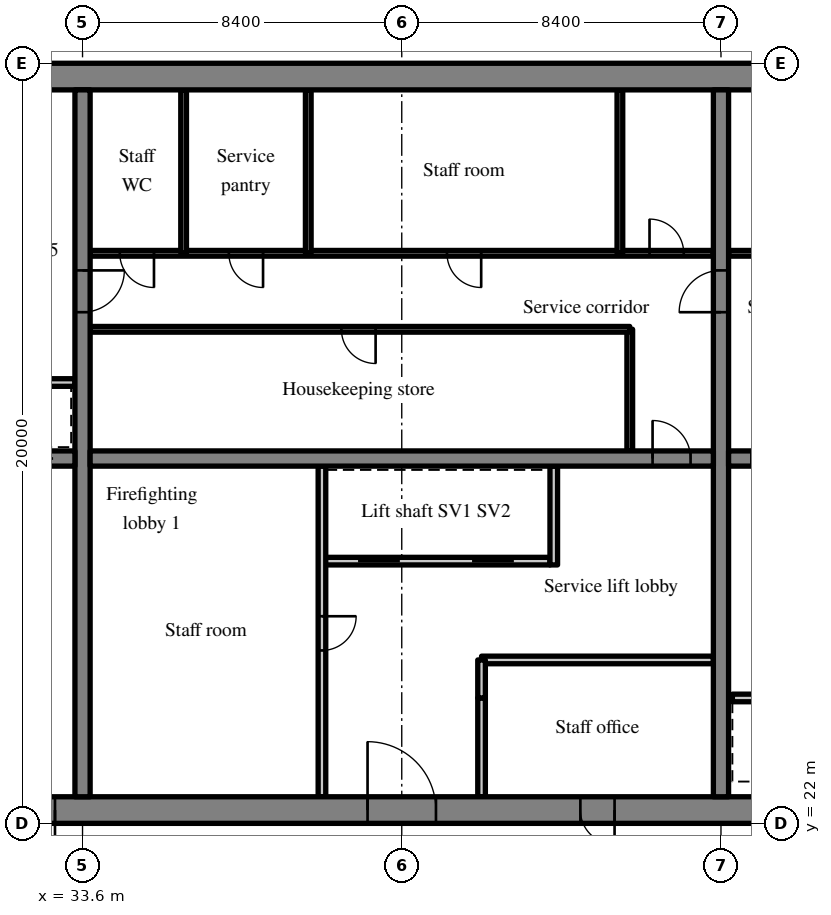
"""IFC4 building model, lengths in metres.
Left out: names, types, materials, properties, quantities, classifications, styles, units other than length and angle.
Written with IfcOpenShell. Run it as: python <this file> out.ifc"""

import sys

from ifc_helpers import new_model, si_unit, direction, frame, frame_2d, origin, place, context, subcontext, project, spatial, rectangle, extrude, source, transform, mapped, element, fill, save


model = new_model("IFC4")
c1 = context("Model", 3, precision=1e-05, world=origin(), true_north=direction((0.0, 1.0)))
c2 = subcontext(c1, "Body", "Model", "MODEL_VIEW")
j1 = project(units=[si_unit("LENGTHUNIT", "METRE"), si_unit("PLANEANGLEUNIT", "RADIAN")], contexts=[c1])
p1 = place(None, origin())
s1 = spatial("IfcSite", under=j1, at=p1, CompositionType="ELEMENT")
p2 = place(p1, origin())
s2 = spatial("IfcBuilding", under=s1, at=p2, CompositionType="ELEMENT")
p3 = place(p2, frame((0.0, 0.0, 155.4)))
s3 = spatial("IfcBuildingStorey", under=s2, at=p3, CompositionType="ELEMENT", Elevation=155.4)
m1 = source(origin(), c2, "Body", "SweptSolid", [
    extrude(rectangle(XDim=50.4, YDim=0.7, at=frame_2d((25.2, 0.0))), origin(), (0.0, 0.0, 1.0), 3.52),
])
p4 = place(p3, frame((25.2, 22.35, 0.0), z_axis=(0.0, 0.0, 1.0), x_axis=(1.0, 0.0, 0.0)))
e1 = element("IfcWall", 1, at=p4, inside=s3, PredefinedType="SHEAR", context=c2, shape_type="MappedRepresentation", body=[
    mapped(m1, transform((0.0, 0.0, 0.0), scale=1.0)),
])
m2 = source(origin(), c2, "Body", "SweptSolid", [
    extrude(rectangle(XDim=1.8, YDim=2.1, at=frame_2d((0.9, 1.05))), frame((0.0, 0.36, 0.0), z_axis=(0.0, -1.0, 0.0), x_axis=(1.0, 0.0, 0.0)), (0.0, 0.0, 1.0), 0.72),
])
p5 = place(p4, frame((15.9, 0.0, 0.0)))
e2 = element("IfcOpeningElement", 2, at=p5, cuts=e1, PredefinedType="OPENING", context=c2, shape_type="MappedRepresentation", body=[
    mapped(m2, transform((0.0, 0.0, 0.0), scale=1.0)),
])
m3 = source(origin(), c2, "Body", "SweptSolid", [
    extrude(rectangle(XDim=0.9, YDim=2.1, at=frame_2d((0.45, 1.05))), frame((0.0, 0.36, 0.0), z_axis=(0.0, -1.0, 0.0), x_axis=(1.0, 0.0, 0.0)), (0.0, 0.0, 1.0), 0.72),
])
p6 = place(p4, frame((21.5, 0.0, 0.0)))
e3 = element("IfcOpeningElement", 3, at=p6, cuts=e1, PredefinedType="OPENING", context=c2, shape_type="MappedRepresentation", body=[
    mapped(m3, transform((0.0, 0.0, 0.0), scale=1.0)),
])
p7 = place(p4, frame((32.7, 0.0, 0.0)))
e4 = element("IfcOpeningElement", 4, at=p7, cuts=e1, PredefinedType="OPENING", context=c2, shape_type="MappedRepresentation", body=[
    mapped(m2, transform((0.0, 0.0, 0.0), scale=1.0)),
])
m4 = source(origin(), c2, "Body", "SweptSolid", [
    extrude(rectangle(XDim=1.2, YDim=2.1, at=frame_2d((0.6, 1.05))), frame((0.0, 0.36, 0.0), z_axis=(0.0, -1.0, 0.0), x_axis=(1.0, 0.0, 0.0)), (0.0, 0.0, 1.0), 0.72),
])
p8 = place(p4, frame((6.475, 0.0, 0.0)))
e5 = element("IfcOpeningElement", 5, at=p8, cuts=e1, PredefinedType="OPENING", context=c2, shape_type="MappedRepresentation", body=[
    mapped(m4, transform((0.0, 0.0, 0.0), scale=1.0)),
])
p9 = place(p4, frame((47.875, 0.0, 0.0)))
e6 = element("IfcOpeningElement", 6, at=p9, cuts=e1, PredefinedType="OPENING", context=c2, shape_type="MappedRepresentation", body=[
    mapped(m4, transform((0.0, 0.0, 0.0), scale=1.0)),
])
p10 = place(p3, frame((25.2, 41.65, 0.0), z_axis=(0.0, 0.0, 1.0), x_axis=(1.0, 0.0, 0.0)))
e7 = element("IfcWall", 7, at=p10, inside=s3, PredefinedType="SHEAR", context=c2, shape_type="MappedRepresentation", body=[
    mapped(m1, transform((0.0, 0.0, 0.0), scale=1.0)),
])
m5 = source(origin(), c2, "Body", "SweptSolid", [
    extrude(rectangle(XDim=18.6, YDim=0.4, at=frame_2d((9.3, 0.0))), origin(), (0.0, 0.0, 1.0), 3.52),
])
p11 = place(p3, frame((33.6, 22.7, 0.0), z_axis=(0.0, 0.0, 1.0), x_axis=(0.0, 1.0, 0.0)))
e8 = element("IfcWall", 8, at=p11, inside=s3, PredefinedType="SHEAR", context=c2, shape_type="MappedRepresentation", body=[
    mapped(m5, transform((0.0, 0.0, 0.0), scale=1.0)),
])
m6 = source(origin(), c2, "Body", "SweptSolid", [
    extrude(rectangle(XDim=1.1, YDim=2.1, at=frame_2d((0.55, 1.05))), frame((0.0, 0.21, 0.0), z_axis=(0.0, -1.0, 0.0), x_axis=(1.0, 0.0, 0.0)), (0.0, 0.0, 1.0), 0.42),
])
p12 = place(p11, frame((12.75, 0.0, 0.0)))
e9 = element("IfcOpeningElement", 9, at=p12, cuts=e8, PredefinedType="OPENING", context=c2, shape_type="MappedRepresentation", body=[
    mapped(m6, transform((0.0, 0.0, 0.0), scale=1.0)),
])
p13 = place(p3, frame((50.4, 22.7, 0.0), z_axis=(0.0, 0.0, 1.0), x_axis=(0.0, 1.0, 0.0)))
e10 = element("IfcWall", 10, at=p13, inside=s3, PredefinedType="SHEAR", context=c2, shape_type="MappedRepresentation", body=[
    mapped(m5, transform((0.0, 0.0, 0.0), scale=1.0)),
])
p14 = place(p13, frame((12.75, 0.0, 0.0)))
e11 = element("IfcOpeningElement", 11, at=p14, cuts=e10, PredefinedType="OPENING", context=c2, shape_type="MappedRepresentation", body=[
    mapped(m6, transform((0.0, 0.0, 0.0), scale=1.0)),
])
m7 = source(origin(), c2, "Body", "SweptSolid", [
    extrude(rectangle(XDim=7.5, YDim=0.4, at=frame_2d((3.75, 0.0))), origin(), (0.0, 0.0, 1.0), 3.52),
])
p15 = place(p3, frame((25.9, 31.6, 0.0), z_axis=(0.0, 0.0, 1.0), x_axis=(1.0, 0.0, 0.0)))
e12 = element("IfcWall", 12, at=p15, inside=s3, PredefinedType="SHEAR", context=c2, shape_type="MappedRepresentation", body=[
    mapped(m7, transform((0.0, 0.0, 0.0), scale=1.0)),
])
p16 = place(p15, frame((5.825, 0.0, 0.0)))
e13 = element("IfcOpeningElement", 13, at=p16, cuts=e12, PredefinedType="OPENING", context=c2, shape_type="MappedRepresentation", body=[
    mapped(m6, transform((0.0, 0.0, 0.0), scale=1.0)),
])
m8 = source(origin(), c2, "Body", "SweptSolid", [
    extrude(rectangle(XDim=16.4, YDim=0.4, at=frame_2d((8.2, 0.0))), origin(), (0.0, 0.0, 1.0), 3.52),
])
p17 = place(p3, frame((33.8, 31.6, 0.0), z_axis=(0.0, 0.0, 1.0), x_axis=(1.0, 0.0, 0.0)))
e14 = element("IfcWall", 14, at=p17, inside=s3, PredefinedType="SHEAR", context=c2, shape_type="MappedRepresentation", body=[
    mapped(m8, transform((0.0, 0.0, 0.0), scale=1.0)),
])
m9 = source(origin(), c2, "Body", "SweptSolid", [
    extrude(rectangle(XDim=1.0, YDim=2.1, at=frame_2d((0.5, 1.05))), frame((0.0, 0.21, 0.0), z_axis=(0.0, -1.0, 0.0), x_axis=(1.0, 0.0, 0.0)), (0.0, 0.0, 1.0), 0.42),
])
p18 = place(p17, frame((14.8, 0.0, 0.0)))
e15 = element("IfcOpeningElement", 15, at=p18, cuts=e14, PredefinedType="OPENING", context=c2, shape_type="MappedRepresentation", body=[
    mapped(m9, transform((0.0, 0.0, 0.0), scale=1.0)),
])
p19 = place(p3, frame((50.6, 31.6, 0.0), z_axis=(0.0, 0.0, 1.0), x_axis=(1.0, 0.0, 0.0)))
e16 = element("IfcWall", 16, at=p19, inside=s3, PredefinedType="SHEAR", context=c2, shape_type="MappedRepresentation", body=[
    mapped(m8, transform((0.0, 0.0, 0.0), scale=1.0)),
])
p20 = place(p19, frame((0.6, 0.0, 0.0)))
e17 = element("IfcOpeningElement", 17, at=p20, cuts=e16, PredefinedType="OPENING", context=c2, shape_type="MappedRepresentation", body=[
    mapped(m9, transform((0.0, 0.0, 0.0), scale=1.0)),
])
m10 = source(origin(), c2, "Body", "SweptSolid", [
    extrude(rectangle(XDim=6.0, YDim=0.2, at=frame_2d((3.0, 0.0))), origin(), (0.0, 0.0, 1.0), 3.52),
])
p21 = place(p3, frame((39.9, 28.9, 0.0), z_axis=(0.0, 0.0, 1.0), x_axis=(1.0, 0.0, 0.0)))
e18 = element("IfcWall", 18, at=p21, inside=s3, PredefinedType="SOLIDWALL", context=c2, shape_type="MappedRepresentation", body=[
    mapped(m10, transform((0.0, 0.0, 0.0), scale=1.0)),
])
m11 = source(origin(), c2, "Body", "SweptSolid", [
    extrude(rectangle(XDim=1.1, YDim=2.1, at=frame_2d((0.55, 1.05))), frame((0.0, 0.11, 0.0), z_axis=(0.0, -1.0, 0.0), x_axis=(1.0, 0.0, 0.0)), (0.0, 0.0, 1.0), 0.22),
])
p22 = place(p21, frame((0.95, 0.0, 0.0)))
e19 = element("IfcOpeningElement", 19, at=p22, cuts=e18, PredefinedType="OPENING", context=c2, shape_type="MappedRepresentation", body=[
    mapped(m11, transform((0.0, 0.0, 0.0), scale=1.0)),
])
p23 = place(p21, frame((3.95, 0.0, 0.0)))
e20 = element("IfcOpeningElement", 20, at=p23, cuts=e18, PredefinedType="OPENING", context=c2, shape_type="MappedRepresentation", body=[
    mapped(m11, transform((0.0, 0.0, 0.0), scale=1.0)),
])
m12 = source(origin(), c2, "Body", "SweptSolid", [
    extrude(rectangle(XDim=8.7, YDim=0.2, at=frame_2d((4.35, 0.0))), origin(), (0.0, 0.0, 1.0), 3.52),
])
p24 = place(p3, frame((39.9, 22.7, 0.0), z_axis=(0.0, 0.0, 1.0), x_axis=(0.0, 1.0, 0.0)))
e21 = element("IfcWall", 21, at=p24, inside=s3, PredefinedType="PARTITIONING", context=c2, shape_type="MappedRepresentation", body=[
    mapped(m12, transform((0.0, 0.0, 0.0), scale=1.0)),
])
m13 = source(origin(), c2, "Body", "SweptSolid", [
    extrude(rectangle(XDim=0.9, YDim=2.1, at=frame_2d((0.45, 1.05))), frame((0.0, 0.11, 0.0), z_axis=(0.0, -1.0, 0.0), x_axis=(1.0, 0.0, 0.0)), (0.0, 0.0, 1.0), 0.22),
])
p25 = place(p24, frame((3.85, 0.0, 0.0)))
e22 = element("IfcOpeningElement", 22, at=p25, cuts=e21, PredefinedType="OPENING", context=c2, shape_type="MappedRepresentation", body=[
    mapped(m13, transform((0.0, 0.0, 0.0), scale=1.0)),
])
m14 = source(origin(), c2, "Body", "SweptSolid", [
    extrude(rectangle(XDim=2.6, YDim=0.2, at=frame_2d((1.3, 0.0))), origin(), (0.0, 0.0, 1.0), 3.52),
])
p26 = place(p3, frame((44.1, 22.7, 0.0), z_axis=(0.0, 0.0, 1.0), x_axis=(0.0, 1.0, 0.0)))
e23 = element("IfcWall", 23, at=p26, inside=s3, PredefinedType="PARTITIONING", context=c2, shape_type="MappedRepresentation", body=[
    mapped(m14, transform((0.0, 0.0, 0.0), scale=1.0)),
])
m15 = source(origin(), c2, "Body", "SweptSolid", [
    extrude(rectangle(XDim=2.6, YDim=0.2, at=frame_2d((1.3, 0.0))), origin(), (0.0, 0.0, 1.0), 3.52),
])
p27 = place(p3, frame((46.0, 28.8, 0.0), z_axis=(0.0, 0.0, 1.0), x_axis=(0.0, 1.0, 0.0)))
e24 = element("IfcWall", 24, at=p27, inside=s3, PredefinedType="SOLIDWALL", context=c2, shape_type="MappedRepresentation", body=[
    mapped(m15, transform((0.0, 0.0, 0.0), scale=1.0)),
])
m16 = source(origin(), c2, "Body", "SweptSolid", [
    extrude(rectangle(XDim=6.1, YDim=0.2, at=frame_2d((3.05, 0.0))), origin(), (0.0, 0.0, 1.0), 3.52),
])
p28 = place(p3, frame((44.1, 26.3, 0.0), z_axis=(0.0, 0.0, 1.0), x_axis=(1.0, 0.0, 0.0)))
e25 = element("IfcWall", 25, at=p28, inside=s3, PredefinedType="PARTITIONING", context=c2, shape_type="MappedRepresentation", body=[
    mapped(m16, transform((0.0, 0.0, 0.0), scale=1.0)),
])
m17 = source(origin(), c2, "Body", "SweptSolid", [
    extrude(rectangle(XDim=1.0, YDim=0.2, at=frame_2d((0.5, 0.0))), origin(), (0.0, 0.0, 1.0), 3.52),
])
p29 = place(p3, frame((44.1, 25.3, 0.0), z_axis=(0.0, 0.0, 1.0), x_axis=(0.0, 1.0, 0.0)))
e26 = element("IfcWall", 26, at=p29, inside=s3, PredefinedType="PARTITIONING", context=c2, shape_type="MappedRepresentation", body=[
    mapped(m17, transform((0.0, 0.0, 0.0), scale=1.0)),
])
m18 = source(origin(), c2, "Body", "SweptSolid", [
    extrude(rectangle(XDim=3.2, YDim=0.15, at=frame_2d((1.6, 0.0))), origin(), (0.0, 0.0, 1.0), 3.52),
])
p30 = place(p3, frame((48.0, 31.8, 0.0), z_axis=(0.0, 0.0, 1.0), x_axis=(0.0, 1.0, 0.0)))
e27 = element("IfcWall", 27, at=p30, inside=s3, PredefinedType="PARTITIONING", context=c2, shape_type="MappedRepresentation", body=[
    mapped(m18, transform((0.0, 0.0, 0.0), scale=1.0)),
])
m19 = source(origin(), c2, "Body", "SweptSolid", [
    extrude(rectangle(XDim=14.2, YDim=0.15, at=frame_2d((7.1, 0.0))), origin(), (0.0, 0.0, 1.0), 3.52),
])
p31 = place(p3, frame((33.8, 35.0, 0.0), z_axis=(0.0, 0.0, 1.0), x_axis=(1.0, 0.0, 0.0)))
e28 = element("IfcWall", 28, at=p31, inside=s3, PredefinedType="PARTITIONING", context=c2, shape_type="MappedRepresentation", body=[
    mapped(m19, transform((0.0, 0.0, 0.0), scale=1.0)),
])
m20 = source(origin(), c2, "Body", "SweptSolid", [
    extrude(rectangle(XDim=0.9, YDim=2.1, at=frame_2d((0.45, 1.05))), frame((0.0, 0.085, 0.0), z_axis=(0.0, -1.0, 0.0), x_axis=(1.0, 0.0, 0.0)), (0.0, 0.0, 1.0), 0.17),
])
p32 = place(p31, frame((6.612, 0.0, 0.0)))
e29 = element("IfcOpeningElement", 29, at=p32, cuts=e28, PredefinedType="OPENING", context=c2, shape_type="MappedRepresentation", body=[
    mapped(m20, transform((0.0, 0.0, 0.0), scale=1.0)),
])
m21 = source(origin(), c2, "Body", "SweptSolid", [
    extrude(rectangle(XDim=16.4, YDim=0.15, at=frame_2d((8.2, 0.0))), origin(), (0.0, 0.0, 1.0), 3.52),
])
p33 = place(p3, frame((33.8, 37.0, 0.0), z_axis=(0.0, 0.0, 1.0), x_axis=(1.0, 0.0, 0.0)))
e30 = element("IfcWall", 30, at=p33, inside=s3, PredefinedType="PARTITIONING", context=c2, shape_type="MappedRepresentation", body=[
    mapped(m21, transform((0.0, 0.0, 0.0), scale=1.0)),
])
p34 = place(p33, frame((0.78, 0.0, 0.0)))
e31 = element("IfcOpeningElement", 31, at=p34, cuts=e30, PredefinedType="OPENING", context=c2, shape_type="MappedRepresentation", body=[
    mapped(m20, transform((0.0, 0.0, 0.0), scale=1.0)),
])
p35 = place(p33, frame((3.65, 0.0, 0.0)))
e32 = element("IfcOpeningElement", 32, at=p35, cuts=e30, PredefinedType="OPENING", context=c2, shape_type="MappedRepresentation", body=[
    mapped(m20, transform((0.0, 0.0, 0.0), scale=1.0)),
])
p36 = place(p33, frame((9.39, 0.0, 0.0)))
e33 = element("IfcOpeningElement", 33, at=p36, cuts=e30, PredefinedType="OPENING", context=c2, shape_type="MappedRepresentation", body=[
    mapped(m20, transform((0.0, 0.0, 0.0), scale=1.0)),
])
p37 = place(p33, frame((14.72, 0.0, 0.0)))
e34 = element("IfcOpeningElement", 34, at=p37, cuts=e30, PredefinedType="OPENING", context=c2, shape_type="MappedRepresentation", body=[
    mapped(m20, transform((0.0, 0.0, 0.0), scale=1.0)),
])
m22 = source(origin(), c2, "Body", "SweptSolid", [
    extrude(rectangle(XDim=4.3, YDim=0.15, at=frame_2d((2.15, 0.0))), origin(), (0.0, 0.0, 1.0), 3.52),
])
for number, where, z_axis, x_axis in (
    (35, (36.26, 37.0, 0.0), (0.0, 0.0, 1.0), (0.0, 1.0, 0.0)),
    (36, (39.54, 37.0, 0.0), (0.0, 0.0, 1.0), (0.0, 1.0, 0.0)),
    (37, (47.74, 37.0, 0.0), (0.0, 0.0, 1.0), (0.0, 1.0, 0.0)),
):
    element("IfcWall", number, at=place(p3, frame(where, z_axis=z_axis, x_axis=x_axis)), inside=s3, PredefinedType="PARTITIONING", context=c2, shape_type="MappedRepresentation", body=[
        mapped(m22, transform((0.0, 0.0, 0.0), scale=1.0)),
    ])
p38 = place(p3, frame((56.7, 25.3, 0.0), z_axis=(0.0, 0.0, 1.0), x_axis=(-1.0, 0.0, 0.0)))
e38 = element("IfcWall", 38, at=p38, inside=s3, PredefinedType="SOLIDWALL", context=c2, shape_type="MappedRepresentation", body=[
    mapped(m10, transform((0.0, 0.0, 0.0), scale=1.0)),
])
p39 = place(p38, frame((0.95, 0.0, 0.0)))
e39 = element("IfcOpeningElement", 39, at=p39, cuts=e38, PredefinedType="OPENING", context=c2, shape_type="MappedRepresentation", body=[
    mapped(m11, transform((0.0, 0.0, 0.0), scale=1.0)),
])
p40 = place(p38, frame((3.95, 0.0, 0.0)))
e40 = element("IfcOpeningElement", 40, at=p40, cuts=e38, PredefinedType="OPENING", context=c2, shape_type="MappedRepresentation", body=[
    mapped(m11, transform((0.0, 0.0, 0.0), scale=1.0)),
])
p41 = place(p3, frame((67.0, 37.0, 0.0), z_axis=(0.0, 0.0, 1.0), x_axis=(-1.0, 0.0, 0.0)))
e41 = element("IfcWall", 41, at=p41, inside=s3, PredefinedType="PARTITIONING", context=c2, shape_type="MappedRepresentation", body=[
    mapped(m21, transform((0.0, 0.0, 0.0), scale=1.0)),
])
p42 = place(p41, frame((6.52, 0.0, 0.0)))
e42 = element("IfcOpeningElement", 42, at=p42, cuts=e41, PredefinedType="OPENING", context=c2, shape_type="MappedRepresentation", body=[
    mapped(m20, transform((0.0, 0.0, 0.0), scale=1.0)),
])
p43 = place(p41, frame((14.72, 0.0, 0.0)))
e43 = element("IfcOpeningElement", 43, at=p43, cuts=e41, PredefinedType="OPENING", context=c2, shape_type="MappedRepresentation", body=[
    mapped(m20, transform((0.0, 0.0, 0.0), scale=1.0)),
])
m23 = source(origin(), c2, "Body", "SweptSolid", [
    extrude(rectangle(XDim=2.25, YDim=0.2, at=frame_2d((1.125, 0.0))), origin(), (0.0, 0.0, 1.0), 3.52),
])
p44 = place(p3, frame((31.15, 33.6, 0.0), z_axis=(0.0, 0.0, 1.0), x_axis=(1.0, 0.0, 0.0)))
e44 = element("IfcWall", 44, at=p44, inside=s3, PredefinedType="SOLIDWALL", context=c2, shape_type="MappedRepresentation", body=[
    mapped(m23, transform((0.0, 0.0, 0.0), scale=1.0)),
])
m24 = source(origin(), c2, "Body", "SweptSolid", [
    extrude(rectangle(XDim=1.8, YDim=2.1, at=frame_2d((0.9, 1.05))), frame((0.0, 0.275, 0.0), z_axis=(0.0, -1.0, 0.0), x_axis=(1.0, 0.0, 0.0)), (0.0, 0.0, 1.0), 0.05),
])
p45 = place(p5, origin())
e45 = element("IfcDoor", 45, at=p45, inside=s3, OperationType="DOUBLE_DOOR_SINGLE_SWING", PredefinedType="DOOR", context=c2, shape_type="MappedRepresentation", body=[
    mapped(m24, transform((0.0, 0.0, 0.0), scale=1.0)),
])
fill(e2, e45)
m25 = source(origin(), c2, "Body", "SweptSolid", [
    extrude(rectangle(XDim=1.0, YDim=2.1, at=frame_2d((0.5, 1.05))), frame((0.0, 0.025, 0.0), z_axis=(0.0, -1.0, 0.0), x_axis=(1.0, 0.0, 0.0)), (0.0, 0.0, 1.0), 0.05),
])
p46 = place(p18, origin())
e46 = element("IfcDoor", 46, at=p46, inside=s3, OperationType="SINGLE_SWING_LEFT", PredefinedType="DOOR", context=c2, shape_type="MappedRepresentation", body=[
    mapped(m25, transform((0.0, 0.0, 0.0), scale=1.0)),
])
fill(e15, e46)
m26 = source(origin(), c2, "Body", "SweptSolid", [
    extrude(rectangle(XDim=1.1, YDim=2.1, at=frame_2d((0.55, 1.05))), frame((0.0, 0.025, 0.0), z_axis=(0.0, -1.0, 0.0), x_axis=(1.0, 0.0, 0.0)), (0.0, 0.0, 1.0), 0.05),
])
p47 = place(p22, origin())
e47 = element("IfcDoor", 47, at=p47, inside=s3, OperationType="SLIDING_TO_LEFT", PredefinedType="DOOR", context=c2, shape_type="MappedRepresentation", body=[
    mapped(m26, transform((0.0, 0.0, 0.0), scale=1.0)),
])
fill(e19, e47)
p48 = place(p23, origin())
e48 = element("IfcDoor", 48, at=p48, inside=s3, OperationType="SLIDING_TO_RIGHT", PredefinedType="DOOR", context=c2, shape_type="MappedRepresentation", body=[
    mapped(m26, transform((0.0, 0.0, 0.0), scale=1.0)),
])
fill(e20, e48)
m27 = source(origin(), c2, "Body", "SweptSolid", [
    extrude(rectangle(XDim=0.9, YDim=2.1, at=frame_2d((0.45, 1.05))), frame((0.0, 0.025, 0.0), z_axis=(0.0, -1.0, 0.0), x_axis=(1.0, 0.0, 0.0)), (0.0, 0.0, 1.0), 0.05),
])
p49 = place(p25, origin())
e49 = element("IfcDoor", 49, at=p49, inside=s3, OperationType="SINGLE_SWING_RIGHT", PredefinedType="DOOR", context=c2, shape_type="MappedRepresentation", body=[
    mapped(m27, transform((0.0, 0.0, 0.0), scale=1.0)),
])
fill(e22, e49)
m28 = source(origin(), c2, "Body", "SweptSolid", [
    extrude(rectangle(XDim=0.9, YDim=2.1, at=frame_2d((0.45, 1.05))), frame((0.0, 0.275, 0.0), z_axis=(0.0, -1.0, 0.0), x_axis=(1.0, 0.0, 0.0)), (0.0, 0.0, 1.0), 0.05),
])
p50 = place(p6, origin())
e50 = element("IfcDoor", 50, at=p50, inside=s3, OperationType="SINGLE_SWING_RIGHT", PredefinedType="DOOR", context=c2, shape_type="MappedRepresentation", body=[
    mapped(m28, transform((0.0, 0.0, 0.0), scale=1.0)),
])
fill(e3, e50)
p51 = place(p32, origin())
e51 = element("IfcDoor", 51, at=p51, inside=s3, OperationType="SINGLE_SWING_RIGHT", PredefinedType="DOOR", context=c2, shape_type="MappedRepresentation", body=[
    mapped(m27, transform((0.0, 0.0, 0.0), scale=1.0)),
])
fill(e29, e51)
p52 = place(p34, origin())
e52 = element("IfcDoor", 52, at=p52, inside=s3, OperationType="SINGLE_SWING_RIGHT", PredefinedType="DOOR", context=c2, shape_type="MappedRepresentation", body=[
    mapped(m27, transform((0.0, 0.0, 0.0), scale=1.0)),
])
fill(e31, e52)
p53 = place(p35, origin())
e53 = element("IfcDoor", 53, at=p53, inside=s3, OperationType="SINGLE_SWING_RIGHT", PredefinedType="DOOR", context=c2, shape_type="MappedRepresentation", body=[
    mapped(m27, transform((0.0, 0.0, 0.0), scale=1.0)),
])
fill(e32, e53)
p54 = place(p36, origin())
e54 = element("IfcDoor", 54, at=p54, inside=s3, OperationType="SINGLE_SWING_RIGHT", PredefinedType="DOOR", context=c2, shape_type="MappedRepresentation", body=[
    mapped(m27, transform((0.0, 0.0, 0.0), scale=1.0)),
])
fill(e33, e54)
p55 = place(p37, origin())
e55 = element("IfcDoor", 55, at=p55, inside=s3, OperationType="SINGLE_SWING_LEFT", PredefinedType="DOOR", context=c2, shape_type="MappedRepresentation", body=[
    mapped(m27, transform((0.0, 0.0, 0.0), scale=1.0)),
])
fill(e34, e55)
m29 = source(origin(), c2, "Body", "SweptSolid", [
    extrude(rectangle(XDim=1.2, YDim=2.1, at=frame_2d((0.6, 1.05))), frame((0.0, 0.275, 0.0), z_axis=(0.0, -1.0, 0.0), x_axis=(1.0, 0.0, 0.0)), (0.0, 0.0, 1.0), 0.05),
])
p56 = place(p8, origin())
e56 = element("IfcDoor", 56, at=p56, inside=s3, OperationType="SINGLE_SWING_RIGHT", PredefinedType="DOOR", context=c2, shape_type="MappedRepresentation", body=[
    mapped(m29, transform((0.0, 0.0, 0.0), scale=1.0)),
])
fill(e5, e56)
p57 = place(p16, origin())
e57 = element("IfcDoor", 57, at=p57, inside=s3, OperationType="SLIDING_TO_RIGHT", PredefinedType="DOOR", context=c2, shape_type="MappedRepresentation", body=[
    mapped(m26, transform((0.0, 0.0, 0.0), scale=1.0)),
])
fill(e13, e57)
p58 = place(p12, origin())
e58 = element("IfcDoor", 58, at=p58, inside=s3, OperationType="SINGLE_SWING_RIGHT", PredefinedType="DOOR", context=c2, shape_type="MappedRepresentation", body=[
    mapped(m26, transform((0.0, 0.0, 0.0), scale=1.0)),
])
fill(e9, e58)
p59 = place(p14, origin())
e59 = element("IfcDoor", 59, at=p59, inside=s3, OperationType="SINGLE_SWING_LEFT", PredefinedType="DOOR", context=c2, shape_type="MappedRepresentation", body=[
    mapped(m26, transform((0.0, 0.0, 0.0), scale=1.0)),
])
fill(e11, e59)
save(model, sys.argv[1])
